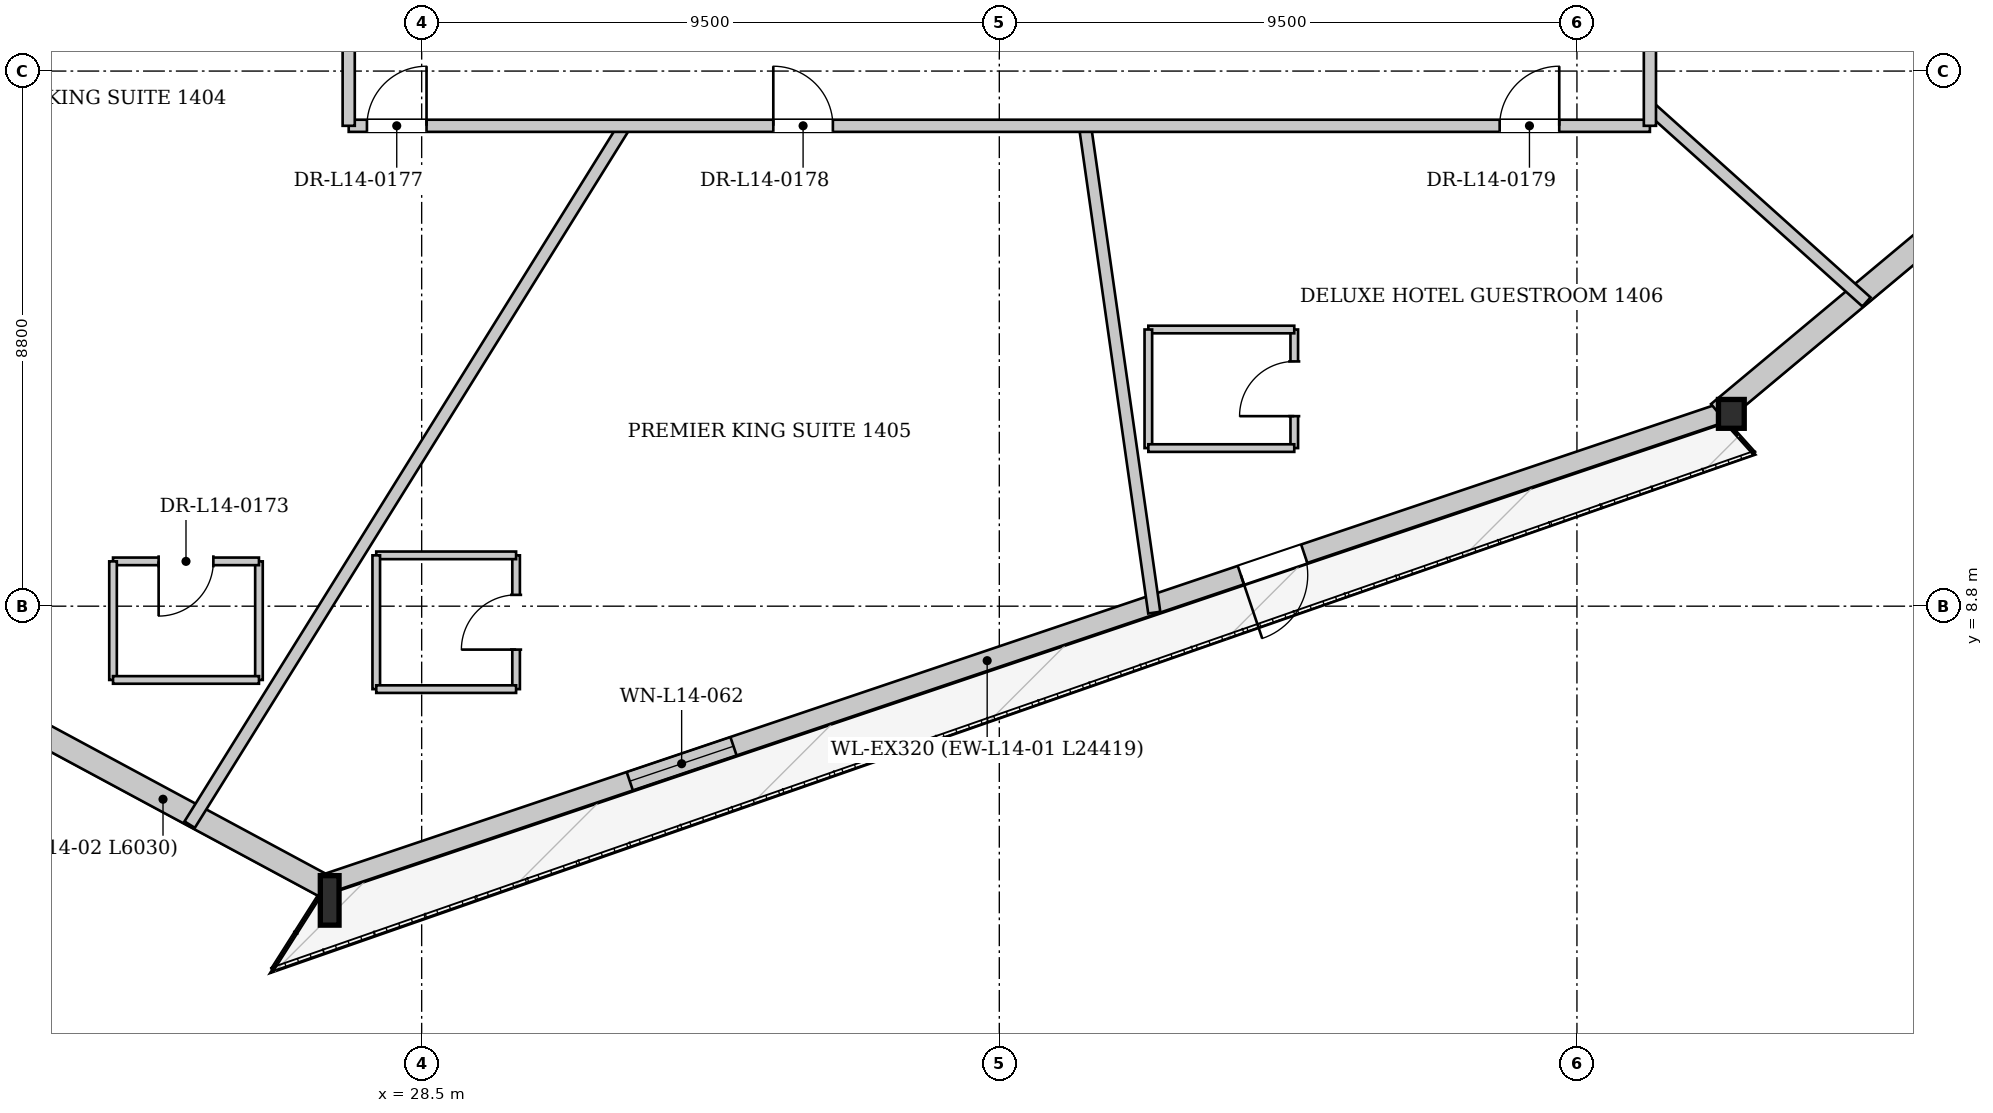
"""IFC4 building model, lengths in metres.
Left out: names, types, materials, properties, quantities, classifications, styles, units other than length and angle.
Written with IfcOpenShell. Run it as: python <this file> out.ifc"""

import sys

from ifc_helpers import new_model, si_unit, direction, frame, frame_2d, origin, origin_2d, place, context, subcontext, project, spatial, rectangle, i_section, extrude, source, transform, mapped, element, fill, save


model = new_model("IFC4")
c1 = context("Model", 3, precision=1e-05, world=origin(), true_north=direction((0.0, 1.0)))
c2 = subcontext(c1, "Body", "Model", "MODEL_VIEW")
j1 = project(units=[si_unit("LENGTHUNIT", "METRE"), si_unit("PLANEANGLEUNIT", "RADIAN")], contexts=[c1])
p1 = place(None, origin())
s1 = spatial("IfcSite", under=j1, at=p1, CompositionType="ELEMENT")
p2 = place(p1, origin())
s2 = spatial("IfcBuilding", under=s1, at=p2, CompositionType="ELEMENT")
p3 = place(p2, frame((0.0, 0.0, 57.7)))
s3 = spatial("IfcBuildingStorey", under=s2, at=p3, CompositionType="ELEMENT", Elevation=57.7)
m1 = source(origin(), c2, "Body", "SweptSolid", [
    extrude(i_section(OverallWidth=0.308, OverallDepth=0.814, WebThickness=0.021, FlangeThickness=0.04, at=origin_2d()), origin(), (0.0, 0.0, 1.0), 3.406),
])
p4 = place(p3, frame((26.811, 4.029, 0.0), z_axis=(0.103719062192, -0.039423278649, 0.993825015402), x_axis=(0.355296786951, 0.934753546761, 0.0)))
e1 = element("IfcColumn", 1, at=p4, inside=s3, PredefinedType="COLUMN", context=c2, shape_type="MappedRepresentation", body=[
    mapped(m1, transform((0.0, 0.0, 0.0), x_axis=(1.0, 0.0, 0.0), y_axis=(0.0, 1.0, 0.0), z_axis=(0.0, 0.0, 1.0), scale=1.0)),
])
m2 = source(origin(), c2, "Body", "SweptSolid", [
    extrude(i_section(OverallWidth=0.424, OverallDepth=0.474, WebThickness=0.043, FlangeThickness=0.068, at=origin_2d()), origin(), (0.0, 0.0, 1.0), 3.4),
])
p5 = place(p3, frame((49.949, 11.833, 0.0), z_axis=(0.053212337596, 0.076263836069, 0.995666748684), x_axis=(-0.820101671528, 0.572217832959, 0.0)))
e2 = element("IfcColumn", 2, at=p5, inside=s3, PredefinedType="COLUMN", context=c2, shape_type="MappedRepresentation", body=[
    mapped(m2, transform((0.0, 0.0, 0.0), x_axis=(1.0, 0.0, 0.0), y_axis=(0.0, 1.0, 0.0), z_axis=(0.0, 0.0, 1.0), scale=1.0)),
])
p6 = place(p3, frame((49.898, 11.984, 0.0), z_axis=(0.0, 0.0, 1.0), x_axis=(-0.94755455003, -0.31959407804, 0.0)))
e3 = element("IfcWall", 3, at=p6, inside=s3, PredefinedType="SOLIDWALL", context=c2, shape_type="SweptSolid", body=[
    extrude(rectangle(XDim=24.419, YDim=0.32, at=frame_2d((12.209, 0.0))), origin(), (0.0, 0.0, 1.0), 2.592),
])
p7 = place(p6, frame((7.264, 0.0, 0.0)))
e4 = element("IfcOpeningElement", 4, at=p7, cuts=e3, PredefinedType="OPENING", context=c2, shape_type="SweptSolid", body=[
    extrude(rectangle(XDim=1.1, YDim=2.3, at=frame_2d((0.55, 1.15))), frame((0.0, 0.17, 0.0), z_axis=(0.0, -1.0, 0.0), x_axis=(1.0, 0.0, 0.0)), (0.0, 0.0, 1.0), 0.34),
])
p8 = place(p6, frame((17.17, 0.0, 0.272)))
e5 = element("IfcOpeningElement", 5, at=p8, cuts=e3, PredefinedType="OPENING", context=c2, shape_type="SweptSolid", body=[
    extrude(rectangle(XDim=1.8, YDim=2.2, at=frame_2d((0.9, 1.1))), frame((0.0, 0.17, 0.0), z_axis=(0.0, -1.0, 0.0), x_axis=(1.0, 0.0, 0.0)), (0.0, 0.0, 1.0), 0.34),
])
p9 = place(p3, frame((26.901, 4.196, 0.0), z_axis=(0.0, 0.0, 1.0), x_axis=(-0.880486700223, 0.474070849906, 0.0)))
e6 = element("IfcWall", 6, at=p9, inside=s3, PredefinedType="SOLIDWALL", context=c2, shape_type="SweptSolid", body=[
    extrude(rectangle(XDim=6.03, YDim=0.38, at=frame_2d((3.015, 0.0))), origin(), (0.0, 0.0, 1.0), 2.592),
])
p10 = place(p3, frame((68.571, 27.629, 0.0), z_axis=(0.0, 0.0, 1.0), x_axis=(-0.767601375753, -0.640927552803, 0.0)))
e7 = element("IfcWall", 7, at=p10, inside=s3, PredefinedType="SOLIDWALL", context=c2, shape_type="SweptSolid", body=[
    extrude(rectangle(XDim=24.419, YDim=0.38, at=frame_2d((12.209, 0.0))), origin(), (0.0, 0.0, 1.0), 2.592),
])
p11 = place(p10, frame((4.137, 0.0, 0.222)))
e8 = element("IfcOpeningElement", 8, at=p11, cuts=e7, PredefinedType="OPENING", context=c2, shape_type="SweptSolid", body=[
    extrude(rectangle(XDim=2.2, YDim=2.25, at=frame_2d((1.1, 1.125))), frame((0.0, 0.2, 0.0), z_axis=(0.0, -1.0, 0.0), x_axis=(1.0, 0.0, 0.0)), (0.0, 0.0, 1.0), 0.4),
])
p12 = place(p10, frame((16.482, 0.0, 0.222)))
e9 = element("IfcOpeningElement", 9, at=p12, cuts=e7, PredefinedType="OPENING", context=c2, shape_type="SweptSolid", body=[
    extrude(rectangle(XDim=2.2, YDim=2.25, at=frame_2d((1.1, 1.125))), frame((0.0, 0.2, 0.0), z_axis=(0.0, -1.0, 0.0), x_axis=(1.0, 0.0, 0.0)), (0.0, 0.0, 1.0), 0.4),
])
p13 = place(p3, frame((31.838, 16.7, 0.0), z_axis=(0.0, 0.0, 1.0), x_axis=(-0.528446628654, -0.848966525055, 0.0)))
e10 = element("IfcWall", 10, at=p13, inside=s3, PredefinedType="PARTITIONING", context=c2, shape_type="SweptSolid", body=[
    extrude(rectangle(XDim=13.537, YDim=0.2, at=frame_2d((6.769, 0.0))), origin(), (0.0, 0.0, 1.0), 3.3),
])
p14 = place(p3, frame((39.409, 16.7, 0.0), z_axis=(0.0, 0.0, 1.0), x_axis=(0.140897236135, -0.990024226395, 0.0)))
e11 = element("IfcWall", 11, at=p14, inside=s3, PredefinedType="PARTITIONING", context=c2, shape_type="SweptSolid", body=[
    extrude(rectangle(XDim=8.087, YDim=0.2, at=frame_2d((4.043, 0.0))), origin(), (0.0, 0.0, 1.0), 3.3),
])
p15 = place(p3, frame((48.7, 17.0, 0.0), z_axis=(0.0, 0.0, 1.0), x_axis=(0.744305347835, -0.667839463632, 0.0)))
e12 = element("IfcWall", 12, at=p15, inside=s3, PredefinedType="PARTITIONING", context=c2, shape_type="SweptSolid", body=[
    extrude(rectangle(XDim=4.786, YDim=0.2, at=frame_2d((2.393, 0.0))), origin(), (0.0, 0.0, 1.0), 3.3),
])
p16 = place(p3, frame((25.824, 7.587, 0.0), z_axis=(0.0, 0.0, 1.0), x_axis=(0.0, 1.0, 0.0)))
e13 = element("IfcWall", 13, at=p16, inside=s3, PredefinedType="PARTITIONING", context=c2, shape_type="SweptSolid", body=[
    extrude(rectangle(XDim=1.95, YDim=0.125, at=frame_2d((0.975, 0.0))), origin(), (0.0, 0.0, 1.0), 3.3),
])
p17 = place(p3, frame((25.824, 9.537, 0.0), z_axis=(0.0, 0.0, 1.0), x_axis=(-1.0, 0.0, 0.0)))
e14 = element("IfcWall", 14, at=p17, inside=s3, PredefinedType="PARTITIONING", context=c2, shape_type="SweptSolid", body=[
    extrude(rectangle(XDim=2.4, YDim=0.125, at=frame_2d((1.2, 0.0))), origin(), (0.0, 0.0, 1.0), 3.3),
])
p18 = place(p17, frame((0.75, 0.0, 0.0)))
e15 = element("IfcOpeningElement", 15, at=p18, cuts=e14, PredefinedType="OPENING", context=c2, shape_type="SweptSolid", body=[
    extrude(rectangle(XDim=0.9, YDim=2.1, at=frame_2d((0.45, 1.05))), frame((0.0, 0.073, 0.0), z_axis=(0.0, -1.0, 0.0), x_axis=(1.0, 0.0, 0.0)), (0.0, 0.0, 1.0), 0.145),
])
p19 = place(p3, frame((23.424, 9.537, 0.0), z_axis=(0.0, 0.0, 1.0), x_axis=(0.0, -1.0, 0.0)))
e16 = element("IfcWall", 16, at=p19, inside=s3, PredefinedType="PARTITIONING", context=c2, shape_type="SweptSolid", body=[
    extrude(rectangle(XDim=1.95, YDim=0.125, at=frame_2d((0.975, 0.0))), origin(), (0.0, 0.0, 1.0), 3.3),
])
p20 = place(p3, frame((23.424, 7.587, 0.0), z_axis=(0.0, 0.0, 1.0), x_axis=(1.0, 0.0, 0.0)))
e17 = element("IfcWall", 17, at=p20, inside=s3, PredefinedType="PARTITIONING", context=c2, shape_type="SweptSolid", body=[
    extrude(rectangle(XDim=2.4, YDim=0.125, at=frame_2d((1.2, 0.0))), origin(), (0.0, 0.0, 1.0), 3.3),
])
p21 = place(p3, frame((30.053, 7.436, 0.0), z_axis=(0.0, 0.0, 1.0), x_axis=(0.0, 1.0, 0.0)))
e18 = element("IfcWall", 18, at=p21, inside=s3, PredefinedType="PARTITIONING", context=c2, shape_type="SweptSolid", body=[
    extrude(rectangle(XDim=2.2, YDim=0.125, at=frame_2d((1.1, 0.0))), origin(), (0.0, 0.0, 1.0), 3.3),
])
p22 = place(p21, frame((0.65, 0.0, 0.0)))
e19 = element("IfcOpeningElement", 19, at=p22, cuts=e18, PredefinedType="OPENING", context=c2, shape_type="SweptSolid", body=[
    extrude(rectangle(XDim=0.9, YDim=2.1, at=frame_2d((0.45, 1.05))), frame((0.0, 0.073, 0.0), z_axis=(0.0, -1.0, 0.0), x_axis=(1.0, 0.0, 0.0)), (0.0, 0.0, 1.0), 0.145),
])
p23 = place(p3, frame((30.053, 9.636, 0.0), z_axis=(0.0, 0.0, 1.0), x_axis=(-1.0, 0.0, 0.0)))
e20 = element("IfcWall", 20, at=p23, inside=s3, PredefinedType="PARTITIONING", context=c2, shape_type="SweptSolid", body=[
    extrude(rectangle(XDim=2.3, YDim=0.125, at=frame_2d((1.15, 0.0))), origin(), (0.0, 0.0, 1.0), 3.3),
])
p24 = place(p3, frame((27.753, 9.636, 0.0), z_axis=(0.0, 0.0, 1.0), x_axis=(0.0, -1.0, 0.0)))
e21 = element("IfcWall", 21, at=p24, inside=s3, PredefinedType="PARTITIONING", context=c2, shape_type="SweptSolid", body=[
    extrude(rectangle(XDim=2.2, YDim=0.125, at=frame_2d((1.1, 0.0))), origin(), (0.0, 0.0, 1.0), 3.3),
])
p25 = place(p3, frame((27.753, 7.436, 0.0), z_axis=(0.0, 0.0, 1.0), x_axis=(1.0, 0.0, 0.0)))
e22 = element("IfcWall", 22, at=p25, inside=s3, PredefinedType="PARTITIONING", context=c2, shape_type="SweptSolid", body=[
    extrude(rectangle(XDim=2.3, YDim=0.125, at=frame_2d((1.15, 0.0))), origin(), (0.0, 0.0, 1.0), 3.3),
])
p26 = place(p3, frame((42.851, 11.4, 0.0), z_axis=(0.0, 0.0, 1.0), x_axis=(0.0, 1.0, 0.0)))
e23 = element("IfcWall", 23, at=p26, inside=s3, PredefinedType="PARTITIONING", context=c2, shape_type="SweptSolid", body=[
    extrude(rectangle(XDim=1.95, YDim=0.125, at=frame_2d((0.975, 0.0))), origin(), (0.0, 0.0, 1.0), 3.3),
])
p27 = place(p26, frame((0.525, 0.0, 0.0)))
e24 = element("IfcOpeningElement", 24, at=p27, cuts=e23, PredefinedType="OPENING", context=c2, shape_type="SweptSolid", body=[
    extrude(rectangle(XDim=0.9, YDim=2.1, at=frame_2d((0.45, 1.05))), frame((0.0, 0.073, 0.0), z_axis=(0.0, -1.0, 0.0), x_axis=(1.0, 0.0, 0.0)), (0.0, 0.0, 1.0), 0.145),
])
p28 = place(p3, frame((42.851, 13.35, 0.0), z_axis=(0.0, 0.0, 1.0), x_axis=(-1.0, 0.0, 0.0)))
e25 = element("IfcWall", 25, at=p28, inside=s3, PredefinedType="PARTITIONING", context=c2, shape_type="SweptSolid", body=[
    extrude(rectangle(XDim=2.4, YDim=0.125, at=frame_2d((1.2, 0.0))), origin(), (0.0, 0.0, 1.0), 2.985),
])
p29 = place(p3, frame((40.451, 13.35, 0.0), z_axis=(0.0, 0.0, 1.0), x_axis=(0.0, -1.0, 0.0)))
e26 = element("IfcWall", 26, at=p29, inside=s3, PredefinedType="PARTITIONING", context=c2, shape_type="SweptSolid", body=[
    extrude(rectangle(XDim=1.95, YDim=0.125, at=frame_2d((0.975, 0.0))), origin(), (0.0, 0.0, 1.0), 3.3),
])
p30 = place(p3, frame((40.451, 11.4, 0.0), z_axis=(0.0, 0.0, 1.0), x_axis=(1.0, 0.0, 0.0)))
e27 = element("IfcWall", 27, at=p30, inside=s3, PredefinedType="PARTITIONING", context=c2, shape_type="SweptSolid", body=[
    extrude(rectangle(XDim=2.4, YDim=0.125, at=frame_2d((1.2, 0.0))), origin(), (0.0, 0.0, 1.0), 3.3),
])
p31 = place(p3, frame((27.3, 16.7, 0.0), z_axis=(0.0, 0.0, 1.0), x_axis=(1.0, 0.0, 0.0)))
e28 = element("IfcWall", 28, at=p31, inside=s3, PredefinedType="PARTITIONING", context=c2, shape_type="SweptSolid", body=[
    extrude(rectangle(XDim=21.4, YDim=0.2, at=frame_2d((10.7, 0.0))), origin(), (0.0, 0.0, 1.0), 3.3),
])
p32 = place(p31, frame((0.3, 0.0, 0.0)))
e29 = element("IfcOpeningElement", 29, at=p32, cuts=e28, PredefinedType="OPENING", context=c2, shape_type="SweptSolid", body=[
    extrude(rectangle(XDim=0.98, YDim=2.15, at=frame_2d((0.49, 1.075))), frame((0.0, 0.11, 0.0), z_axis=(0.0, -1.0, 0.0), x_axis=(1.0, 0.0, 0.0)), (0.0, 0.0, 1.0), 0.22),
])
p33 = place(p31, frame((6.983, 0.0, 0.0)))
e30 = element("IfcOpeningElement", 30, at=p33, cuts=e28, PredefinedType="OPENING", context=c2, shape_type="SweptSolid", body=[
    extrude(rectangle(XDim=0.98, YDim=2.15, at=frame_2d((0.49, 1.075))), frame((0.0, 0.11, 0.0), z_axis=(0.0, -1.0, 0.0), x_axis=(1.0, 0.0, 0.0)), (0.0, 0.0, 1.0), 0.22),
])
p34 = place(p31, frame((18.929, 0.0, 0.0)))
e31 = element("IfcOpeningElement", 31, at=p34, cuts=e28, PredefinedType="OPENING", context=c2, shape_type="SweptSolid", body=[
    extrude(rectangle(XDim=0.98, YDim=2.15, at=frame_2d((0.49, 1.075))), frame((0.0, 0.11, 0.0), z_axis=(0.0, -1.0, 0.0), x_axis=(1.0, 0.0, 0.0)), (0.0, 0.0, 1.0), 0.22),
])
p35 = place(p3, frame((27.3, 16.7, 0.0), z_axis=(0.0, 0.0, 1.0), x_axis=(0.0, 1.0, 0.0)))
e32 = element("IfcWall", 32, at=p35, inside=s3, PredefinedType="PARTITIONING", context=c2, shape_type="SweptSolid", body=[
    extrude(rectangle(XDim=19.8, YDim=0.2, at=frame_2d((9.9, 0.0))), origin(), (0.0, 0.0, 1.0), 3.3),
])
p36 = place(p35, frame((10.32, 0.0, 0.0)))
e33 = element("IfcOpeningElement", 33, at=p36, cuts=e32, PredefinedType="OPENING", context=c2, shape_type="SweptSolid", body=[
    extrude(rectangle(XDim=0.98, YDim=2.15, at=frame_2d((0.49, 1.075))), frame((0.0, 0.11, 0.0), z_axis=(0.0, -1.0, 0.0), x_axis=(1.0, 0.0, 0.0)), (0.0, 0.0, 1.0), 0.22),
])
p37 = place(p3, frame((48.7, 16.7, 0.0), z_axis=(0.0, 0.0, 1.0), x_axis=(0.0, 1.0, 0.0)))
e34 = element("IfcWall", 34, at=p37, inside=s3, PredefinedType="PARTITIONING", context=c2, shape_type="SweptSolid", body=[
    extrude(rectangle(XDim=19.8, YDim=0.2, at=frame_2d((9.9, 0.0))), origin(), (0.0, 0.0, 1.0), 3.3),
])
p38 = place(p37, frame((2.042, 0.0, 0.0)))
e35 = element("IfcOpeningElement", 35, at=p38, cuts=e34, PredefinedType="OPENING", context=c2, shape_type="SweptSolid", body=[
    extrude(rectangle(XDim=0.98, YDim=2.15, at=frame_2d((0.49, 1.075))), frame((0.0, 0.11, 0.0), z_axis=(0.0, -1.0, 0.0), x_axis=(1.0, 0.0, 0.0)), (0.0, 0.0, 1.0), 0.22),
])
m3 = source(origin(), c2, "Body", "SweptSolid", [
    extrude(rectangle(XDim=1.1, YDim=2.3, at=frame_2d((0.55, 1.15))), frame((0.0, 0.025, 0.0), z_axis=(0.0, -1.0, 0.0), x_axis=(1.0, 0.0, 0.0)), (0.0, 0.0, 1.0), 0.05),
])
p39 = place(p7, origin())
e36 = element("IfcDoor", 36, at=p39, inside=s3, OperationType="SINGLE_SWING_RIGHT", PredefinedType="DOOR", context=c2, shape_type="MappedRepresentation", body=[
    mapped(m3, transform((0.0, 0.0, 0.0), x_axis=(1.0, 0.0, 0.0), y_axis=(0.0, 1.0, 0.0), z_axis=(0.0, 0.0, 1.0), scale=1.0)),
])
fill(e4, e36)
m4 = source(origin(), c2, "Body", "SweptSolid", [
    extrude(rectangle(XDim=1.8, YDim=2.2, at=frame_2d((0.9, 1.1))), frame((0.0, 0.03, 0.0), z_axis=(0.0, -1.0, 0.0), x_axis=(1.0, 0.0, 0.0)), (0.0, 0.0, 1.0), 0.06),
])
p40 = place(p8, origin())
e37 = element("IfcWindow", 37, at=p40, inside=s3, PartitioningType="SINGLE_PANEL", PredefinedType="WINDOW", context=c2, shape_type="MappedRepresentation", body=[
    mapped(m4, transform((0.0, 0.0, 0.0), x_axis=(1.0, 0.0, 0.0), y_axis=(0.0, 1.0, 0.0), z_axis=(0.0, 0.0, 1.0), scale=1.0)),
])
fill(e5, e37)
m5 = source(origin(), c2, "Body", "SweptSolid", [
    extrude(rectangle(XDim=0.9, YDim=2.1, at=frame_2d((0.45, 1.05))), frame((0.0, 0.025, 0.0), z_axis=(0.0, -1.0, 0.0), x_axis=(1.0, 0.0, 0.0)), (0.0, 0.0, 1.0), 0.05),
])
p41 = place(p18, origin())
e38 = element("IfcDoor", 38, at=p41, inside=s3, OperationType="SINGLE_SWING_RIGHT", PredefinedType="DOOR", context=c2, shape_type="MappedRepresentation", body=[
    mapped(m5, transform((0.0, 0.0, 0.0), x_axis=(1.0, 0.0, 0.0), y_axis=(0.0, 1.0, 0.0), z_axis=(0.0, 0.0, 1.0), scale=1.0)),
])
fill(e15, e38)
p42 = place(p22, origin())
e39 = element("IfcDoor", 39, at=p42, inside=s3, OperationType="SINGLE_SWING_LEFT", PredefinedType="DOOR", context=c2, shape_type="MappedRepresentation", body=[
    mapped(m5, transform((0.0, 0.0, 0.0), x_axis=(1.0, 0.0, 0.0), y_axis=(0.0, 1.0, 0.0), z_axis=(0.0, 0.0, 1.0), scale=1.0)),
])
fill(e19, e39)
p43 = place(p27, origin())
e40 = element("IfcDoor", 40, at=p43, inside=s3, OperationType="SINGLE_SWING_LEFT", PredefinedType="DOOR", context=c2, shape_type="MappedRepresentation", body=[
    mapped(m5, transform((0.0, 0.0, 0.0), x_axis=(1.0, 0.0, 0.0), y_axis=(0.0, 1.0, 0.0), z_axis=(0.0, 0.0, 1.0), scale=1.0)),
])
fill(e24, e40)
m6 = source(origin(), c2, "Body", "SweptSolid", [
    extrude(rectangle(XDim=0.98, YDim=2.15, at=frame_2d((0.49, 1.075))), frame((0.0, 0.025, 0.0), z_axis=(0.0, -1.0, 0.0), x_axis=(1.0, 0.0, 0.0)), (0.0, 0.0, 1.0), 0.05),
])
p44 = place(p32, origin())
e41 = element("IfcDoor", 41, at=p44, inside=s3, OperationType="SINGLE_SWING_RIGHT", PredefinedType="DOOR", context=c2, shape_type="MappedRepresentation", body=[
    mapped(m6, transform((0.0, 0.0, 0.0), x_axis=(1.0, 0.0, 0.0), y_axis=(0.0, 1.0, 0.0), z_axis=(0.0, 0.0, 1.0), scale=1.0)),
])
fill(e29, e41)
p45 = place(p33, origin())
e42 = element("IfcDoor", 42, at=p45, inside=s3, OperationType="SINGLE_SWING_LEFT", PredefinedType="DOOR", context=c2, shape_type="MappedRepresentation", body=[
    mapped(m6, transform((0.0, 0.0, 0.0), x_axis=(1.0, 0.0, 0.0), y_axis=(0.0, 1.0, 0.0), z_axis=(0.0, 0.0, 1.0), scale=1.0)),
])
fill(e30, e42)
p46 = place(p34, origin())
e43 = element("IfcDoor", 43, at=p46, inside=s3, OperationType="SINGLE_SWING_RIGHT", PredefinedType="DOOR", context=c2, shape_type="MappedRepresentation", body=[
    mapped(m6, transform((0.0, 0.0, 0.0), x_axis=(1.0, 0.0, 0.0), y_axis=(0.0, 1.0, 0.0), z_axis=(0.0, 0.0, 1.0), scale=1.0)),
])
fill(e31, e43)
save(model, sys.argv[1])
